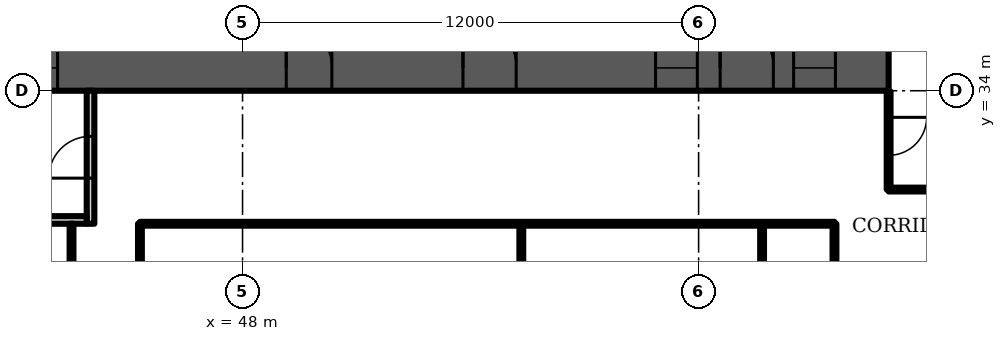
"""IFC4 building model, lengths in metres.
Left out: names, types, materials, properties, quantities, classifications, styles, units other than length and angle.
Written with IfcOpenShell. Run it as: python <this file> out.ifc"""

import sys

from ifc_helpers import new_model, si_unit, direction, frame, frame_2d, origin, place, context, subcontext, project, spatial, rectangle, extrude, element, fill, save


model = new_model("IFC4")
c1 = context("Model", 3, precision=1e-05, world=origin(), true_north=direction((0.0, 1.0)))
c2 = subcontext(c1, "Body", "Model", "MODEL_VIEW")
j1 = project(units=[si_unit("LENGTHUNIT", "METRE"), si_unit("PLANEANGLEUNIT", "RADIAN")], contexts=[c1])
p1 = place(None, origin())
s1 = spatial("IfcSite", under=j1, at=p1, CompositionType="ELEMENT")
p2 = place(p1, origin())
s2 = spatial("IfcBuilding", under=s1, at=p2, CompositionType="ELEMENT")
p3 = place(p2, frame((0.0, 0.0, 84.7)))
s3 = spatial("IfcBuildingStorey", under=s2, at=p3, CompositionType="ELEMENT", Elevation=84.7)
p4 = place(p3, frame((9.0, 34.6, 0.0), z_axis=(0.0, 0.0, 1.0), x_axis=(1.0, 0.0, 0.0)))
e1 = element("IfcWall", 1, at=p4, inside=s3, PredefinedType="SHEAR", context=c2, shape_type="SweptSolid", body=[
    extrude(rectangle(XDim=56.0, YDim=1.2, at=frame_2d((28.0, 0.0))), origin(), (0.0, 0.0, 1.0), 3.6),
])
p5 = place(p4, frame((3.3, 0.0, 0.0)))
e2 = element("IfcOpeningElement", 2, at=p5, cuts=e1, PredefinedType="OPENING", context=c2, shape_type="SweptSolid", body=[
    extrude(rectangle(XDim=1.0, YDim=2.1, at=frame_2d((0.5, 1.05))), frame((0.0, 0.61, 0.0), z_axis=(0.0, -1.0, 0.0), x_axis=(1.0, 0.0, 0.0)), (0.0, 0.0, 1.0), 1.22),
])
p6 = place(p4, frame((7.867, 0.0, 0.0)))
e3 = element("IfcOpeningElement", 3, at=p6, cuts=e1, PredefinedType="OPENING", context=c2, shape_type="SweptSolid", body=[
    extrude(rectangle(XDim=1.1, YDim=2.1, at=frame_2d((0.55, 1.05))), frame((0.0, 0.61, 0.0), z_axis=(0.0, -1.0, 0.0), x_axis=(1.0, 0.0, 0.0)), (0.0, 0.0, 1.0), 1.22),
])
p7 = place(p4, frame((12.033, 0.0, 0.0)))
e4 = element("IfcOpeningElement", 4, at=p7, cuts=e1, PredefinedType="OPENING", context=c2, shape_type="SweptSolid", body=[
    extrude(rectangle(XDim=1.1, YDim=2.1, at=frame_2d((0.55, 1.05))), frame((0.0, 0.61, 0.0), z_axis=(0.0, -1.0, 0.0), x_axis=(1.0, 0.0, 0.0)), (0.0, 0.0, 1.0), 1.22),
])
p8 = place(p4, frame((9.8, 0.0, 0.0)))
e5 = element("IfcOpeningElement", 5, at=p8, cuts=e1, PredefinedType="OPENING", context=c2, shape_type="SweptSolid", body=[
    extrude(rectangle(XDim=1.4, YDim=2.1, at=frame_2d((0.7, 1.05))), frame((0.0, 0.61, 0.0), z_axis=(0.0, -1.0, 0.0), x_axis=(1.0, 0.0, 0.0)), (0.0, 0.0, 1.0), 1.22),
])
p9 = place(p4, frame((14.65, 0.0, 0.0)))
e6 = element("IfcOpeningElement", 6, at=p9, cuts=e1, PredefinedType="OPENING", context=c2, shape_type="SweptSolid", body=[
    extrude(rectangle(XDim=1.2, YDim=2.1, at=frame_2d((0.6, 1.05))), frame((0.0, 0.61, 0.0), z_axis=(0.0, -1.0, 0.0), x_axis=(1.0, 0.0, 0.0)), (0.0, 0.0, 1.0), 1.22),
])
p10 = place(p4, frame((21.867, 0.0, 0.0)))
e7 = element("IfcOpeningElement", 7, at=p10, cuts=e1, PredefinedType="OPENING", context=c2, shape_type="SweptSolid", body=[
    extrude(rectangle(XDim=1.1, YDim=2.1, at=frame_2d((0.55, 1.05))), frame((0.0, 0.61, 0.0), z_axis=(0.0, -1.0, 0.0), x_axis=(1.0, 0.0, 0.0)), (0.0, 0.0, 1.0), 1.22),
])
p11 = place(p4, frame((26.033, 0.0, 0.0)))
e8 = element("IfcOpeningElement", 8, at=p11, cuts=e1, PredefinedType="OPENING", context=c2, shape_type="SweptSolid", body=[
    extrude(rectangle(XDim=1.1, YDim=2.1, at=frame_2d((0.55, 1.05))), frame((0.0, 0.61, 0.0), z_axis=(0.0, -1.0, 0.0), x_axis=(1.0, 0.0, 0.0)), (0.0, 0.0, 1.0), 1.22),
])
p12 = place(p4, frame((23.8, 0.0, 0.0)))
e9 = element("IfcOpeningElement", 9, at=p12, cuts=e1, PredefinedType="OPENING", context=c2, shape_type="SweptSolid", body=[
    extrude(rectangle(XDim=1.4, YDim=2.1, at=frame_2d((0.7, 1.05))), frame((0.0, 0.61, 0.0), z_axis=(0.0, -1.0, 0.0), x_axis=(1.0, 0.0, 0.0)), (0.0, 0.0, 1.0), 1.22),
])
p13 = place(p4, frame((28.867, 0.0, 0.0)))
e10 = element("IfcOpeningElement", 10, at=p13, cuts=e1, PredefinedType="OPENING", context=c2, shape_type="SweptSolid", body=[
    extrude(rectangle(XDim=1.1, YDim=2.1, at=frame_2d((0.55, 1.05))), frame((0.0, 0.61, 0.0), z_axis=(0.0, -1.0, 0.0), x_axis=(1.0, 0.0, 0.0)), (0.0, 0.0, 1.0), 1.22),
])
p14 = place(p4, frame((33.033, 0.0, 0.0)))
e11 = element("IfcOpeningElement", 11, at=p14, cuts=e1, PredefinedType="OPENING", context=c2, shape_type="SweptSolid", body=[
    extrude(rectangle(XDim=1.1, YDim=2.1, at=frame_2d((0.55, 1.05))), frame((0.0, 0.61, 0.0), z_axis=(0.0, -1.0, 0.0), x_axis=(1.0, 0.0, 0.0)), (0.0, 0.0, 1.0), 1.22),
])
p15 = place(p4, frame((40.15, 0.0, 0.0)))
e12 = element("IfcOpeningElement", 12, at=p15, cuts=e1, PredefinedType="OPENING", context=c2, shape_type="SweptSolid", body=[
    extrude(rectangle(XDim=1.2, YDim=2.1, at=frame_2d((0.6, 1.05))), frame((0.0, 0.61, 0.0), z_axis=(0.0, -1.0, 0.0), x_axis=(1.0, 0.0, 0.0)), (0.0, 0.0, 1.0), 1.22),
])
p16 = place(p4, frame((44.8, 0.0, 0.0)))
e13 = element("IfcOpeningElement", 13, at=p16, cuts=e1, PredefinedType="OPENING", context=c2, shape_type="SweptSolid", body=[
    extrude(rectangle(XDim=1.4, YDim=2.1, at=frame_2d((0.7, 1.05))), frame((0.0, 0.61, 0.0), z_axis=(0.0, -1.0, 0.0), x_axis=(1.0, 0.0, 0.0)), (0.0, 0.0, 1.0), 1.22),
])
p17 = place(p4, frame((49.867, 0.0, 0.0)))
e14 = element("IfcOpeningElement", 14, at=p17, cuts=e1, PredefinedType="OPENING", context=c2, shape_type="SweptSolid", body=[
    extrude(rectangle(XDim=1.1, YDim=2.1, at=frame_2d((0.55, 1.05))), frame((0.0, 0.61, 0.0), z_axis=(0.0, -1.0, 0.0), x_axis=(1.0, 0.0, 0.0)), (0.0, 0.0, 1.0), 1.22),
])
p18 = place(p4, frame((53.5, 0.0, 0.0)))
e15 = element("IfcOpeningElement", 15, at=p18, cuts=e1, PredefinedType="OPENING", context=c2, shape_type="SweptSolid", body=[
    extrude(rectangle(XDim=1.1, YDim=2.1, at=frame_2d((0.55, 1.05))), frame((0.0, 0.61, 0.0), z_axis=(0.0, -1.0, 0.0), x_axis=(1.0, 0.0, 0.0)), (0.0, 0.0, 1.0), 1.22),
])
p19 = place(p4, frame((51.567, 0.0, 0.0)))
e16 = element("IfcOpeningElement", 16, at=p19, cuts=e1, PredefinedType="OPENING", context=c2, shape_type="SweptSolid", body=[
    extrude(rectangle(XDim=1.4, YDim=2.1, at=frame_2d((0.7, 1.05))), frame((0.0, 0.61, 0.0), z_axis=(0.0, -1.0, 0.0), x_axis=(1.0, 0.0, 0.0)), (0.0, 0.0, 1.0), 1.22),
])
p20 = place(p3, frame((44.0, 30.5, 0.0), z_axis=(0.0, 0.0, 1.0), x_axis=(0.0, 1.0, 0.0)))
e17 = element("IfcWall", 17, at=p20, inside=s3, PredefinedType="PARTITIONING", context=c2, shape_type="SweptSolid", body=[
    extrude(rectangle(XDim=3.5, YDim=0.2, at=frame_2d((1.75, 0.0))), origin(), (0.0, 0.0, 1.0), 3.2),
])
p21 = place(p20, frame((1.2, 0.0, 0.0)))
e18 = element("IfcOpeningElement", 18, at=p21, cuts=e17, PredefinedType="OPENING", context=c2, shape_type="SweptSolid", body=[
    extrude(rectangle(XDim=1.1, YDim=2.1, at=frame_2d((0.55, 1.05))), frame((0.0, 0.11, 0.0), z_axis=(0.0, -1.0, 0.0), x_axis=(1.0, 0.0, 0.0)), (0.0, 0.0, 1.0), 0.22),
])
p22 = place(p3, frame((41.1, 30.6, 0.0), z_axis=(0.0, 0.0, 1.0), x_axis=(1.0, 0.0, 0.0)))
e19 = element("IfcWall", 19, at=p22, inside=s3, PredefinedType="PARTITIONING", context=c2, shape_type="SweptSolid", body=[
    extrude(rectangle(XDim=2.8, YDim=0.2, at=frame_2d((1.4, 0.0))), origin(), (0.0, 0.0, 1.0), 3.2),
])
p23 = place(p3, frame((43.5, 14.93, 0.0), z_axis=(0.0, 0.0, 1.0), x_axis=(0.0, 1.0, 0.0)))
e20 = element("IfcWall", 20, at=p23, inside=s3, PredefinedType="PARTITIONING", context=c2, shape_type="SweptSolid", body=[
    extrude(rectangle(XDim=15.57, YDim=0.1, at=frame_2d((7.785, 0.0))), origin(), (0.0, 0.0, 1.0), 3.2),
])
p24 = place(p23, frame((2.45, 0.0, 0.0)))
e21 = element("IfcOpeningElement", 21, at=p24, cuts=e20, PredefinedType="OPENING", context=c2, shape_type="SweptSolid", body=[
    extrude(rectangle(XDim=1.8, YDim=2.1, at=frame_2d((0.9, 1.05))), frame((0.0, 0.06, 0.0), z_axis=(0.0, -1.0, 0.0), x_axis=(1.0, 0.0, 0.0)), (0.0, 0.0, 1.0), 0.12),
])
p25 = place(p3, frame((45.3, 14.93, 0.0), z_axis=(0.0, 0.0, 1.0), x_axis=(0.0, 1.0, 0.0)))
e22 = element("IfcWall", 22, at=p25, inside=s3, PredefinedType="PARTITIONING", context=c2, shape_type="SweptSolid", body=[
    extrude(rectangle(XDim=15.57, YDim=0.1, at=frame_2d((7.785, 0.0))), origin(), (0.0, 0.0, 1.0), 3.2),
])
p26 = place(p25, frame((1.785, 0.0, 0.0)))
e23 = element("IfcOpeningElement", 23, at=p26, cuts=e22, PredefinedType="OPENING", context=c2, shape_type="SweptSolid", body=[
    extrude(rectangle(XDim=1.8, YDim=2.1, at=frame_2d((0.9, 1.05))), frame((0.0, 0.06, 0.0), z_axis=(0.0, -1.0, 0.0), x_axis=(1.0, 0.0, 0.0)), (0.0, 0.0, 1.0), 0.12),
])
p27 = place(p3, frame((45.3, 30.5, 0.0), z_axis=(0.0, 0.0, 1.0), x_axis=(1.0, 0.0, 0.0)))
e24 = element("IfcWall", 24, at=p27, inside=s3, PredefinedType="PARTITIONING", context=c2, shape_type="SweptSolid", body=[
    extrude(rectangle(XDim=18.275, YDim=0.1, at=frame_2d((9.137, 0.0))), origin(), (0.0, 0.0, 1.0), 3.2),
])
for number, where, z_axis, x_axis in (
    (25, (55.335, 14.93, 0.0), (0.0, 0.0, 1.0), (0.0, 1.0, 0.0)),
    (26, (61.67, 14.93, 0.0), (0.0, 0.0, 1.0), (0.0, 1.0, 0.0)),
):
    element("IfcWall", number, at=place(p3, frame(where, z_axis=z_axis, x_axis=x_axis)), inside=s3, PredefinedType="PARTITIONING", context=c2, shape_type="SweptSolid", body=[
        extrude(rectangle(XDim=15.57, YDim=0.1, at=frame_2d((7.785, 0.0))), origin(), (0.0, 0.0, 1.0), 3.2),
    ])
p28 = place(p3, frame((63.575, 29.075, 0.0), z_axis=(0.0, 0.0, 1.0), x_axis=(0.0, 1.0, 0.0)))
e27 = element("IfcWall", 27, at=p28, inside=s3, PredefinedType="PARTITIONING", context=c2, shape_type="SweptSolid", body=[
    extrude(rectangle(XDim=1.425, YDim=0.1, at=frame_2d((0.712, 0.0))), origin(), (0.0, 0.0, 1.0), 3.2),
])
p29 = place(p3, frame((65.0, 31.4, 0.0), z_axis=(0.0, 0.0, 1.0), x_axis=(0.0, 1.0, 0.0)))
e28 = element("IfcWall", 28, at=p29, inside=s3, PredefinedType="PARTITIONING", context=c2, shape_type="SweptSolid", body=[
    extrude(rectangle(XDim=2.58, YDim=0.1, at=frame_2d((1.29, 0.0))), origin(), (0.0, 0.0, 1.0), 3.2),
])
p30 = place(p29, frame((0.9, 0.0, 0.0)))
e29 = element("IfcOpeningElement", 29, at=p30, cuts=e28, PredefinedType="OPENING", context=c2, shape_type="SweptSolid", body=[
    extrude(rectangle(XDim=1.0, YDim=2.1, at=frame_2d((0.5, 1.05))), frame((0.0, 0.06, 0.0), z_axis=(0.0, -1.0, 0.0), x_axis=(1.0, 0.0, 0.0)), (0.0, 0.0, 1.0), 0.12),
])
p31 = place(p3, frame((65.0, 31.4, 0.0), z_axis=(0.0, 0.0, 1.0), x_axis=(1.0, 0.0, 0.0)))
e30 = element("IfcWall", 30, at=p31, inside=s3, PredefinedType="PARTITIONING", context=c2, shape_type="SweptSolid", body=[
    extrude(rectangle(XDim=7.125, YDim=0.1, at=frame_2d((3.562, 0.0))), origin(), (0.0, 0.0, 1.0), 3.2),
])
p32 = place(p31, frame((5.705, 0.0, 0.0)))
e31 = element("IfcOpeningElement", 31, at=p32, cuts=e30, PredefinedType="OPENING", context=c2, shape_type="SweptSolid", body=[
    extrude(rectangle(XDim=1.0, YDim=2.1, at=frame_2d((0.5, 1.05))), frame((0.0, 0.06, 0.0), z_axis=(0.0, -1.0, 0.0), x_axis=(1.0, 0.0, 0.0)), (0.0, 0.0, 1.0), 0.12),
])
p33 = place(p14, origin())
e32 = element("IfcDoor", 32, at=p33, inside=s3, OperationType="DOUBLE_DOOR_SLIDING", PredefinedType="DOOR", context=c2, shape_type="SweptSolid", body=[
    extrude(rectangle(XDim=1.1, YDim=2.1, at=frame_2d((0.55, 1.05))), frame((0.0, 0.025, 0.0), z_axis=(0.0, -1.0, 0.0), x_axis=(1.0, 0.0, 0.0)), (0.0, 0.0, 1.0), 0.05),
])
fill(e11, e32)
p34 = place(p15, origin())
e33 = element("IfcDoor", 33, at=p34, inside=s3, OperationType="SINGLE_SWING_LEFT", PredefinedType="DOOR", context=c2, shape_type="SweptSolid", body=[
    extrude(rectangle(XDim=1.2, YDim=2.1, at=frame_2d((0.6, 1.05))), frame((0.0, 0.025, 0.0), z_axis=(0.0, -1.0, 0.0), x_axis=(1.0, 0.0, 0.0)), (0.0, 0.0, 1.0), 0.05),
])
fill(e12, e33)
p35 = place(p16, origin())
e34 = element("IfcDoor", 34, at=p35, inside=s3, OperationType="DOUBLE_DOOR_SINGLE_SWING", PredefinedType="DOOR", context=c2, shape_type="SweptSolid", body=[
    extrude(rectangle(XDim=1.4, YDim=2.1, at=frame_2d((0.7, 1.05))), frame((0.0, 0.025, 0.0), z_axis=(0.0, -1.0, 0.0), x_axis=(1.0, 0.0, 0.0)), (0.0, 0.0, 1.0), 0.05),
])
fill(e13, e34)
p36 = place(p17, origin())
e35 = element("IfcDoor", 35, at=p36, inside=s3, OperationType="DOUBLE_DOOR_SLIDING", PredefinedType="DOOR", context=c2, shape_type="SweptSolid", body=[
    extrude(rectangle(XDim=1.1, YDim=2.1, at=frame_2d((0.55, 1.05))), frame((0.0, 0.025, 0.0), z_axis=(0.0, -1.0, 0.0), x_axis=(1.0, 0.0, 0.0)), (0.0, 0.0, 1.0), 0.05),
])
fill(e14, e35)
p37 = place(p18, origin())
e36 = element("IfcDoor", 36, at=p37, inside=s3, OperationType="DOUBLE_DOOR_SLIDING", PredefinedType="DOOR", context=c2, shape_type="SweptSolid", body=[
    extrude(rectangle(XDim=1.1, YDim=2.1, at=frame_2d((0.55, 1.05))), frame((0.0, 0.025, 0.0), z_axis=(0.0, -1.0, 0.0), x_axis=(1.0, 0.0, 0.0)), (0.0, 0.0, 1.0), 0.05),
])
fill(e15, e36)
p38 = place(p19, origin())
e37 = element("IfcDoor", 37, at=p38, inside=s3, OperationType="DOUBLE_DOOR_SINGLE_SWING", PredefinedType="DOOR", context=c2, shape_type="SweptSolid", body=[
    extrude(rectangle(XDim=1.4, YDim=2.1, at=frame_2d((0.7, 1.05))), frame((0.0, 0.025, 0.0), z_axis=(0.0, -1.0, 0.0), x_axis=(1.0, 0.0, 0.0)), (0.0, 0.0, 1.0), 0.05),
])
fill(e16, e37)
p39 = place(p21, origin())
e38 = element("IfcDoor", 38, at=p39, inside=s3, OperationType="SINGLE_SWING_LEFT", PredefinedType="DOOR", context=c2, shape_type="SweptSolid", body=[
    extrude(rectangle(XDim=1.1, YDim=2.1, at=frame_2d((0.55, 1.05))), frame((0.0, 0.025, 0.0), z_axis=(0.0, -1.0, 0.0), x_axis=(1.0, 0.0, 0.0)), (0.0, 0.0, 1.0), 0.05),
])
fill(e18, e38)
p40 = place(p30, origin())
e39 = element("IfcDoor", 39, at=p40, inside=s3, OperationType="SINGLE_SWING_RIGHT", PredefinedType="DOOR", context=c2, shape_type="SweptSolid", body=[
    extrude(rectangle(XDim=1.0, YDim=2.1, at=frame_2d((0.5, 1.05))), frame((0.0, 0.025, 0.0), z_axis=(0.0, -1.0, 0.0), x_axis=(1.0, 0.0, 0.0)), (0.0, 0.0, 1.0), 0.05),
])
fill(e29, e39)
save(model, sys.argv[1])
